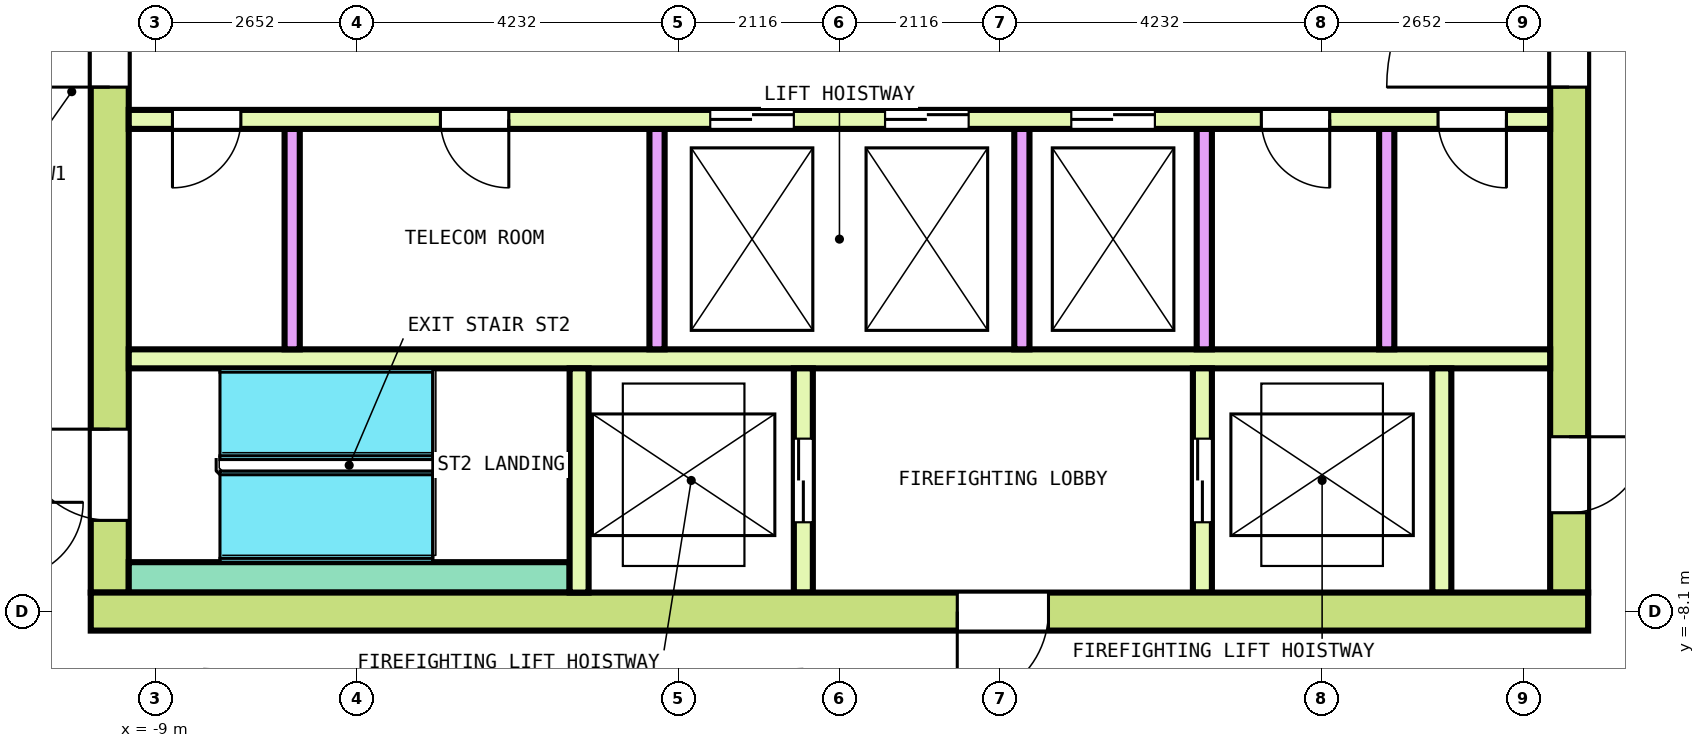
"""IFC4 building model, lengths in metres.
Left out: names, types, materials, properties, quantities, classifications, styles, units other than length and angle.
Written with IfcOpenShell. Run it as: python <this file> out.ifc"""

import sys

from ifc_helpers import new_model, si_unit, direction, frame, frame_2d, origin, place, context, subcontext, project, spatial, rectangle, extrude, element, fill, save


model = new_model("IFC4")
c1 = context("Model", 3, precision=1e-05, world=origin(), true_north=direction((0.0, 1.0)))
c2 = subcontext(c1, "Body", "Model", "MODEL_VIEW")
j1 = project(units=[si_unit("LENGTHUNIT", "METRE"), si_unit("PLANEANGLEUNIT", "RADIAN")], contexts=[c1])
p1 = place(None, origin())
s1 = spatial("IfcSite", under=j1, at=p1, CompositionType="ELEMENT")
p2 = place(p1, origin())
s2 = spatial("IfcBuilding", under=s1, at=p2, CompositionType="ELEMENT")
p3 = place(p2, frame((0.0, 0.0, 279.0)))
s3 = spatial("IfcBuildingStorey", under=s2, at=p3, CompositionType="ELEMENT", Elevation=279.0)
p4 = place(p3, frame((-9.85, -8.1, 0.0), z_axis=(0.0, 0.0, 1.0), x_axis=(1.0, 0.0, 0.0)))
e1 = element("IfcWall", 1, at=p4, inside=s3, PredefinedType="SHEAR", context=c2, shape_type="SweptSolid", body=[
    extrude(rectangle(XDim=19.7, YDim=0.5, at=frame_2d((9.85, 0.0))), origin(), (0.0, 0.0, 1.0), 3.7),
])
p5 = place(p4, frame((11.4, 0.0, 0.0)))
e2 = element("IfcOpeningElement", 2, at=p5, cuts=e1, PredefinedType="OPENING", context=c2, shape_type="SweptSolid", body=[
    extrude(rectangle(XDim=1.2, YDim=2.1, at=frame_2d((0.6, 1.05))), frame((0.0, 0.26, 0.0), z_axis=(0.0, -1.0, 0.0), x_axis=(1.0, 0.0, 0.0)), (0.0, 0.0, 1.0), 0.52),
])
p6 = place(p3, frame((-9.6, -7.85, 0.0), z_axis=(0.0, 0.0, 1.0), x_axis=(0.0, 1.0, 0.0)))
e3 = element("IfcWall", 3, at=p6, inside=s3, PredefinedType="SHEAR", context=c2, shape_type="SweptSolid", body=[
    extrude(rectangle(XDim=15.7, YDim=0.5, at=frame_2d((7.85, 0.0))), origin(), (0.0, 0.0, 1.0), 3.7),
])
p7 = place(p6, frame((6.65, 0.0, 0.0)))
e4 = element("IfcOpeningElement", 4, at=p7, cuts=e3, PredefinedType="OPENING", context=c2, shape_type="SweptSolid", body=[
    extrude(rectangle(XDim=2.4, YDim=2.1, at=frame_2d((1.2, 1.05))), frame((0.0, 0.26, 0.0), z_axis=(0.0, -1.0, 0.0), x_axis=(1.0, 0.0, 0.0)), (0.0, 0.0, 1.0), 0.52),
])
p8 = place(p6, frame((13.55, 0.0, 0.0)))
e5 = element("IfcOpeningElement", 5, at=p8, cuts=e3, PredefinedType="OPENING", context=c2, shape_type="SweptSolid", body=[
    extrude(rectangle(XDim=1.2, YDim=2.1, at=frame_2d((0.6, 1.05))), frame((0.0, 0.26, 0.0), z_axis=(0.0, -1.0, 0.0), x_axis=(1.0, 0.0, 0.0)), (0.0, 0.0, 1.0), 0.52),
])
p9 = place(p6, frame((0.95, 0.0, 0.0)))
e6 = element("IfcOpeningElement", 6, at=p9, cuts=e3, PredefinedType="OPENING", context=c2, shape_type="SweptSolid", body=[
    extrude(rectangle(XDim=1.2, YDim=2.1, at=frame_2d((0.6, 1.05))), frame((0.0, 0.26, 0.0), z_axis=(0.0, -1.0, 0.0), x_axis=(1.0, 0.0, 0.0)), (0.0, 0.0, 1.0), 0.52),
])
p10 = place(p3, frame((9.6, -7.85, 0.0), z_axis=(0.0, 0.0, 1.0), x_axis=(0.0, 1.0, 0.0)))
e7 = element("IfcWall", 7, at=p10, inside=s3, PredefinedType="SHEAR", context=c2, shape_type="SweptSolid", body=[
    extrude(rectangle(XDim=15.7, YDim=0.5, at=frame_2d((7.85, 0.0))), origin(), (0.0, 0.0, 1.0), 3.7),
])
p11 = place(p10, frame((6.65, 0.0, 0.0)))
e8 = element("IfcOpeningElement", 8, at=p11, cuts=e7, PredefinedType="OPENING", context=c2, shape_type="SweptSolid", body=[
    extrude(rectangle(XDim=2.4, YDim=2.1, at=frame_2d((1.2, 1.05))), frame((0.0, 0.26, 0.0), z_axis=(0.0, -1.0, 0.0), x_axis=(1.0, 0.0, 0.0)), (0.0, 0.0, 1.0), 0.52),
])
p12 = place(p10, frame((13.55, 0.0, 0.0)))
e9 = element("IfcOpeningElement", 9, at=p12, cuts=e7, PredefinedType="OPENING", context=c2, shape_type="SweptSolid", body=[
    extrude(rectangle(XDim=1.2, YDim=2.1, at=frame_2d((0.6, 1.05))), frame((0.0, 0.26, 0.0), z_axis=(0.0, -1.0, 0.0), x_axis=(1.0, 0.0, 0.0)), (0.0, 0.0, 1.0), 0.52),
])
p13 = place(p10, frame((1.05, 0.0, 0.0)))
e10 = element("IfcOpeningElement", 10, at=p13, cuts=e7, PredefinedType="OPENING", context=c2, shape_type="SweptSolid", body=[
    extrude(rectangle(XDim=1.0, YDim=2.1, at=frame_2d((0.5, 1.05))), frame((0.0, 0.26, 0.0), z_axis=(0.0, -1.0, 0.0), x_axis=(1.0, 0.0, 0.0)), (0.0, 0.0, 1.0), 0.52),
])
p14 = place(p3, frame((-9.35, -1.625, 0.0), z_axis=(0.0, 0.0, 1.0), x_axis=(1.0, 0.0, 0.0)))
e11 = element("IfcWall", 11, at=p14, inside=s3, PredefinedType="SOLIDWALL", context=c2, shape_type="SweptSolid", body=[
    extrude(rectangle(XDim=18.7, YDim=0.25, at=frame_2d((9.35, 0.0))), origin(), (0.0, 0.0, 1.0), 3.7),
])
p15 = place(p14, frame((7.65, 0.0, 0.0)))
e12 = element("IfcOpeningElement", 12, at=p15, cuts=e11, PredefinedType="OPENING", context=c2, shape_type="SweptSolid", body=[
    extrude(rectangle(XDim=1.1, YDim=2.1, at=frame_2d((0.55, 1.05))), frame((0.0, 0.135, 0.0), z_axis=(0.0, -1.0, 0.0), x_axis=(1.0, 0.0, 0.0)), (0.0, 0.0, 1.0), 0.27),
])
p16 = place(p14, frame((9.95, 0.0, 0.0)))
e13 = element("IfcOpeningElement", 13, at=p16, cuts=e11, PredefinedType="OPENING", context=c2, shape_type="SweptSolid", body=[
    extrude(rectangle(XDim=1.1, YDim=2.1, at=frame_2d((0.55, 1.05))), frame((0.0, 0.135, 0.0), z_axis=(0.0, -1.0, 0.0), x_axis=(1.0, 0.0, 0.0)), (0.0, 0.0, 1.0), 0.27),
])
p17 = place(p14, frame((12.4, 0.0, 0.0)))
e14 = element("IfcOpeningElement", 14, at=p17, cuts=e11, PredefinedType="OPENING", context=c2, shape_type="SweptSolid", body=[
    extrude(rectangle(XDim=1.1, YDim=2.1, at=frame_2d((0.55, 1.05))), frame((0.0, 0.135, 0.0), z_axis=(0.0, -1.0, 0.0), x_axis=(1.0, 0.0, 0.0)), (0.0, 0.0, 1.0), 0.27),
])
p18 = place(p14, frame((0.575, 0.0, 0.0)))
e15 = element("IfcOpeningElement", 15, at=p18, cuts=e11, PredefinedType="OPENING", context=c2, shape_type="SweptSolid", body=[
    extrude(rectangle(XDim=0.9, YDim=2.1, at=frame_2d((0.45, 1.05))), frame((0.0, 0.135, 0.0), z_axis=(0.0, -1.0, 0.0), x_axis=(1.0, 0.0, 0.0)), (0.0, 0.0, 1.0), 0.27),
])
p19 = place(p14, frame((4.1, 0.0, 0.0)))
e16 = element("IfcOpeningElement", 16, at=p19, cuts=e11, PredefinedType="OPENING", context=c2, shape_type="SweptSolid", body=[
    extrude(rectangle(XDim=0.9, YDim=2.1, at=frame_2d((0.45, 1.05))), frame((0.0, 0.135, 0.0), z_axis=(0.0, -1.0, 0.0), x_axis=(1.0, 0.0, 0.0)), (0.0, 0.0, 1.0), 0.27),
])
p20 = place(p14, frame((14.9, 0.0, 0.0)))
e17 = element("IfcOpeningElement", 17, at=p20, cuts=e11, PredefinedType="OPENING", context=c2, shape_type="SweptSolid", body=[
    extrude(rectangle(XDim=0.9, YDim=2.1, at=frame_2d((0.45, 1.05))), frame((0.0, 0.135, 0.0), z_axis=(0.0, -1.0, 0.0), x_axis=(1.0, 0.0, 0.0)), (0.0, 0.0, 1.0), 0.27),
])
p21 = place(p14, frame((17.225, 0.0, 0.0)))
e18 = element("IfcOpeningElement", 18, at=p21, cuts=e11, PredefinedType="OPENING", context=c2, shape_type="SweptSolid", body=[
    extrude(rectangle(XDim=0.9, YDim=2.1, at=frame_2d((0.45, 1.05))), frame((0.0, 0.135, 0.0), z_axis=(0.0, -1.0, 0.0), x_axis=(1.0, 0.0, 0.0)), (0.0, 0.0, 1.0), 0.27),
])
p22 = place(p3, frame((-9.35, -4.775, 0.0), z_axis=(0.0, 0.0, 1.0), x_axis=(1.0, 0.0, 0.0)))
e19 = element("IfcWall", 19, at=p22, inside=s3, PredefinedType="SOLIDWALL", context=c2, shape_type="SweptSolid", body=[
    extrude(rectangle(XDim=18.7, YDim=0.25, at=frame_2d((9.35, 0.0))), origin(), (0.0, 0.0, 1.0), 3.7),
])
for number, where, z_axis, x_axis in (
    (20, (-7.2, -4.65, 0.0), (0.0, 0.0, 1.0), (0.0, 1.0, 0.0)),
    (21, (-2.4, -4.65, 0.0), (0.0, 0.0, 1.0), (0.0, 1.0, 0.0)),
    (22, (2.4, -4.65, 0.0), (0.0, 0.0, 1.0), (0.0, 1.0, 0.0)),
    (23, (4.8, -4.65, 0.0), (0.0, 0.0, 1.0), (0.0, 1.0, 0.0)),
    (24, (7.2, -4.65, 0.0), (0.0, 0.0, 1.0), (0.0, 1.0, 0.0)),
):
    element("IfcWall", number, at=place(p3, frame(where, z_axis=z_axis, x_axis=x_axis)), inside=s3, PredefinedType="SOLIDWALL", context=c2, shape_type="SweptSolid", body=[
        extrude(rectangle(XDim=2.9, YDim=0.2, at=frame_2d((1.45, 0.0))), origin(), (0.0, 0.0, 1.0), 3.7),
    ])
p23 = place(p3, frame((-9.35, -7.65, 0.0), z_axis=(0.0, 0.0, 1.0), x_axis=(1.0, 0.0, 0.0)))
e25 = element("IfcWall", 25, at=p23, inside=s3, PredefinedType="SOLIDWALL", context=c2, shape_type="SweptSolid", body=[
    extrude(rectangle(XDim=5.8, YDim=0.4, at=frame_2d((2.9, 0.0))), origin(), (0.0, 0.0, 1.0), 3.7),
])
p24 = place(p3, frame((-3.425, -7.85, 0.0), z_axis=(0.0, 0.0, 1.0), x_axis=(0.0, 1.0, 0.0)))
e26 = element("IfcWall", 26, at=p24, inside=s3, PredefinedType="SOLIDWALL", context=c2, shape_type="SweptSolid", body=[
    extrude(rectangle(XDim=2.95, YDim=0.25, at=frame_2d((1.475, 0.0))), origin(), (0.0, 0.0, 1.0), 3.7),
])
p25 = place(p3, frame((-0.475, -7.85, 0.0), z_axis=(0.0, 0.0, 1.0), x_axis=(0.0, 1.0, 0.0)))
e27 = element("IfcWall", 27, at=p25, inside=s3, PredefinedType="SOLIDWALL", context=c2, shape_type="SweptSolid", body=[
    extrude(rectangle(XDim=2.95, YDim=0.25, at=frame_2d((1.475, 0.0))), origin(), (0.0, 0.0, 1.0), 3.7),
])
p26 = place(p25, frame((0.925, 0.0, 0.0)))
e28 = element("IfcOpeningElement", 28, at=p26, cuts=e27, PredefinedType="OPENING", context=c2, shape_type="SweptSolid", body=[
    extrude(rectangle(XDim=1.1, YDim=2.1, at=frame_2d((0.55, 1.05))), frame((0.0, 0.135, 0.0), z_axis=(0.0, -1.0, 0.0), x_axis=(1.0, 0.0, 0.0)), (0.0, 0.0, 1.0), 0.27),
])
p27 = place(p3, frame((4.775, -7.85, 0.0), z_axis=(0.0, 0.0, 1.0), x_axis=(0.0, 1.0, 0.0)))
e29 = element("IfcWall", 29, at=p27, inside=s3, PredefinedType="SOLIDWALL", context=c2, shape_type="SweptSolid", body=[
    extrude(rectangle(XDim=2.95, YDim=0.25, at=frame_2d((1.475, 0.0))), origin(), (0.0, 0.0, 1.0), 3.7),
])
p28 = place(p27, frame((0.925, 0.0, 0.0)))
e30 = element("IfcOpeningElement", 30, at=p28, cuts=e29, PredefinedType="OPENING", context=c2, shape_type="SweptSolid", body=[
    extrude(rectangle(XDim=1.1, YDim=2.1, at=frame_2d((0.55, 1.05))), frame((0.0, 0.135, 0.0), z_axis=(0.0, -1.0, 0.0), x_axis=(1.0, 0.0, 0.0)), (0.0, 0.0, 1.0), 0.27),
])
p29 = place(p3, frame((7.925, -7.85, 0.0), z_axis=(0.0, 0.0, 1.0), x_axis=(0.0, 1.0, 0.0)))
e31 = element("IfcWall", 31, at=p29, inside=s3, PredefinedType="SOLIDWALL", context=c2, shape_type="SweptSolid", body=[
    extrude(rectangle(XDim=2.95, YDim=0.25, at=frame_2d((1.475, 0.0))), origin(), (0.0, 0.0, 1.0), 3.7),
])
p30 = place(p15, origin())
e32 = element("IfcDoor", 32, at=p30, inside=s3, OperationType="DOUBLE_DOOR_SLIDING", PredefinedType="DOOR", context=c2, shape_type="SweptSolid", body=[
    extrude(rectangle(XDim=1.1, YDim=2.1, at=frame_2d((0.55, 1.05))), frame((0.0, 0.075, 0.0), z_axis=(0.0, -1.0, 0.0), x_axis=(1.0, 0.0, 0.0)), (0.0, 0.0, 1.0), 0.15),
])
fill(e12, e32)
p31 = place(p16, origin())
e33 = element("IfcDoor", 33, at=p31, inside=s3, OperationType="DOUBLE_DOOR_SLIDING", PredefinedType="DOOR", context=c2, shape_type="SweptSolid", body=[
    extrude(rectangle(XDim=1.1, YDim=2.1, at=frame_2d((0.55, 1.05))), frame((0.0, 0.075, 0.0), z_axis=(0.0, -1.0, 0.0), x_axis=(1.0, 0.0, 0.0)), (0.0, 0.0, 1.0), 0.15),
])
fill(e13, e33)
p32 = place(p17, origin())
e34 = element("IfcDoor", 34, at=p32, inside=s3, OperationType="DOUBLE_DOOR_SLIDING", PredefinedType="DOOR", context=c2, shape_type="SweptSolid", body=[
    extrude(rectangle(XDim=1.1, YDim=2.1, at=frame_2d((0.55, 1.05))), frame((0.0, 0.075, 0.0), z_axis=(0.0, -1.0, 0.0), x_axis=(1.0, 0.0, 0.0)), (0.0, 0.0, 1.0), 0.15),
])
fill(e14, e34)
p33 = place(p26, origin())
e35 = element("IfcDoor", 35, at=p33, inside=s3, OperationType="DOUBLE_DOOR_SLIDING", PredefinedType="DOOR", context=c2, shape_type="SweptSolid", body=[
    extrude(rectangle(XDim=1.1, YDim=2.1, at=frame_2d((0.55, 1.05))), frame((0.0, 0.075, 0.0), z_axis=(0.0, -1.0, 0.0), x_axis=(1.0, 0.0, 0.0)), (0.0, 0.0, 1.0), 0.15),
])
fill(e28, e35)
p34 = place(p28, origin())
e36 = element("IfcDoor", 36, at=p34, inside=s3, OperationType="DOUBLE_DOOR_SLIDING", PredefinedType="DOOR", context=c2, shape_type="SweptSolid", body=[
    extrude(rectangle(XDim=1.1, YDim=2.1, at=frame_2d((0.55, 1.05))), frame((0.0, 0.075, 0.0), z_axis=(0.0, -1.0, 0.0), x_axis=(1.0, 0.0, 0.0)), (0.0, 0.0, 1.0), 0.15),
])
fill(e30, e36)
p35 = place(p7, origin())
e37 = element("IfcDoor", 37, at=p35, inside=s3, OperationType="DOUBLE_DOOR_SINGLE_SWING", PredefinedType="DOOR", context=c2, shape_type="SweptSolid", body=[
    extrude(rectangle(XDim=2.4, YDim=2.1, at=frame_2d((1.2, 1.05))), frame((0.0, 0.2, 0.0), z_axis=(0.0, -1.0, 0.0), x_axis=(1.0, 0.0, 0.0)), (0.0, 0.0, 1.0), 0.4),
])
fill(e4, e37)
p36 = place(p11, origin())
e38 = element("IfcDoor", 38, at=p36, inside=s3, OperationType="DOUBLE_DOOR_SINGLE_SWING", PredefinedType="DOOR", context=c2, shape_type="SweptSolid", body=[
    extrude(rectangle(XDim=2.4, YDim=2.1, at=frame_2d((1.2, 1.05))), frame((0.0, 0.2, 0.0), z_axis=(0.0, -1.0, 0.0), x_axis=(1.0, 0.0, 0.0)), (0.0, 0.0, 1.0), 0.4),
])
fill(e8, e38)
p37 = place(p9, origin())
e39 = element("IfcDoor", 39, at=p37, inside=s3, OperationType="SINGLE_SWING_LEFT", PredefinedType="DOOR", context=c2, shape_type="SweptSolid", body=[
    extrude(rectangle(XDim=1.2, YDim=2.1, at=frame_2d((0.6, 1.05))), frame((0.0, 0.2, 0.0), z_axis=(0.0, -1.0, 0.0), x_axis=(1.0, 0.0, 0.0)), (0.0, 0.0, 1.0), 0.4),
])
fill(e6, e39)
p38 = place(p5, origin())
e40 = element("IfcDoor", 40, at=p38, inside=s3, OperationType="SINGLE_SWING_LEFT", PredefinedType="DOOR", context=c2, shape_type="SweptSolid", body=[
    extrude(rectangle(XDim=1.2, YDim=2.1, at=frame_2d((0.6, 1.05))), frame((0.0, 0.2, 0.0), z_axis=(0.0, -1.0, 0.0), x_axis=(1.0, 0.0, 0.0)), (0.0, 0.0, 1.0), 0.4),
])
fill(e2, e40)
p39 = place(p13, origin())
e41 = element("IfcDoor", 41, at=p39, inside=s3, OperationType="SINGLE_SWING_LEFT", PredefinedType="DOOR", context=c2, shape_type="SweptSolid", body=[
    extrude(rectangle(XDim=1.0, YDim=2.1, at=frame_2d((0.5, 1.05))), frame((0.0, 0.2, 0.0), z_axis=(0.0, -1.0, 0.0), x_axis=(1.0, 0.0, 0.0)), (0.0, 0.0, 1.0), 0.4),
])
fill(e10, e41)
p40 = place(p18, origin())
e42 = element("IfcDoor", 42, at=p40, inside=s3, OperationType="SINGLE_SWING_RIGHT", PredefinedType="DOOR", context=c2, shape_type="SweptSolid", body=[
    extrude(rectangle(XDim=0.9, YDim=2.1, at=frame_2d((0.45, 1.05))), frame((0.0, 0.075, 0.0), z_axis=(0.0, -1.0, 0.0), x_axis=(1.0, 0.0, 0.0)), (0.0, 0.0, 1.0), 0.15),
])
fill(e15, e42)
p41 = place(p19, origin())
e43 = element("IfcDoor", 43, at=p41, inside=s3, OperationType="SINGLE_SWING_LEFT", PredefinedType="DOOR", context=c2, shape_type="SweptSolid", body=[
    extrude(rectangle(XDim=0.9, YDim=2.1, at=frame_2d((0.45, 1.05))), frame((0.0, 0.075, 0.0), z_axis=(0.0, -1.0, 0.0), x_axis=(1.0, 0.0, 0.0)), (0.0, 0.0, 1.0), 0.15),
])
fill(e16, e43)
p42 = place(p20, origin())
e44 = element("IfcDoor", 44, at=p42, inside=s3, OperationType="SINGLE_SWING_RIGHT", PredefinedType="DOOR", context=c2, shape_type="SweptSolid", body=[
    extrude(rectangle(XDim=0.9, YDim=2.1, at=frame_2d((0.45, 1.05))), frame((0.0, 0.075, 0.0), z_axis=(0.0, -1.0, 0.0), x_axis=(1.0, 0.0, 0.0)), (0.0, 0.0, 1.0), 0.15),
])
fill(e17, e44)
p43 = place(p21, origin())
e45 = element("IfcDoor", 45, at=p43, inside=s3, OperationType="SINGLE_SWING_LEFT", PredefinedType="DOOR", context=c2, shape_type="SweptSolid", body=[
    extrude(rectangle(XDim=0.9, YDim=2.1, at=frame_2d((0.45, 1.05))), frame((0.0, 0.075, 0.0), z_axis=(0.0, -1.0, 0.0), x_axis=(1.0, 0.0, 0.0)), (0.0, 0.0, 1.0), 0.15),
])
fill(e18, e45)
save(model, sys.argv[1])
